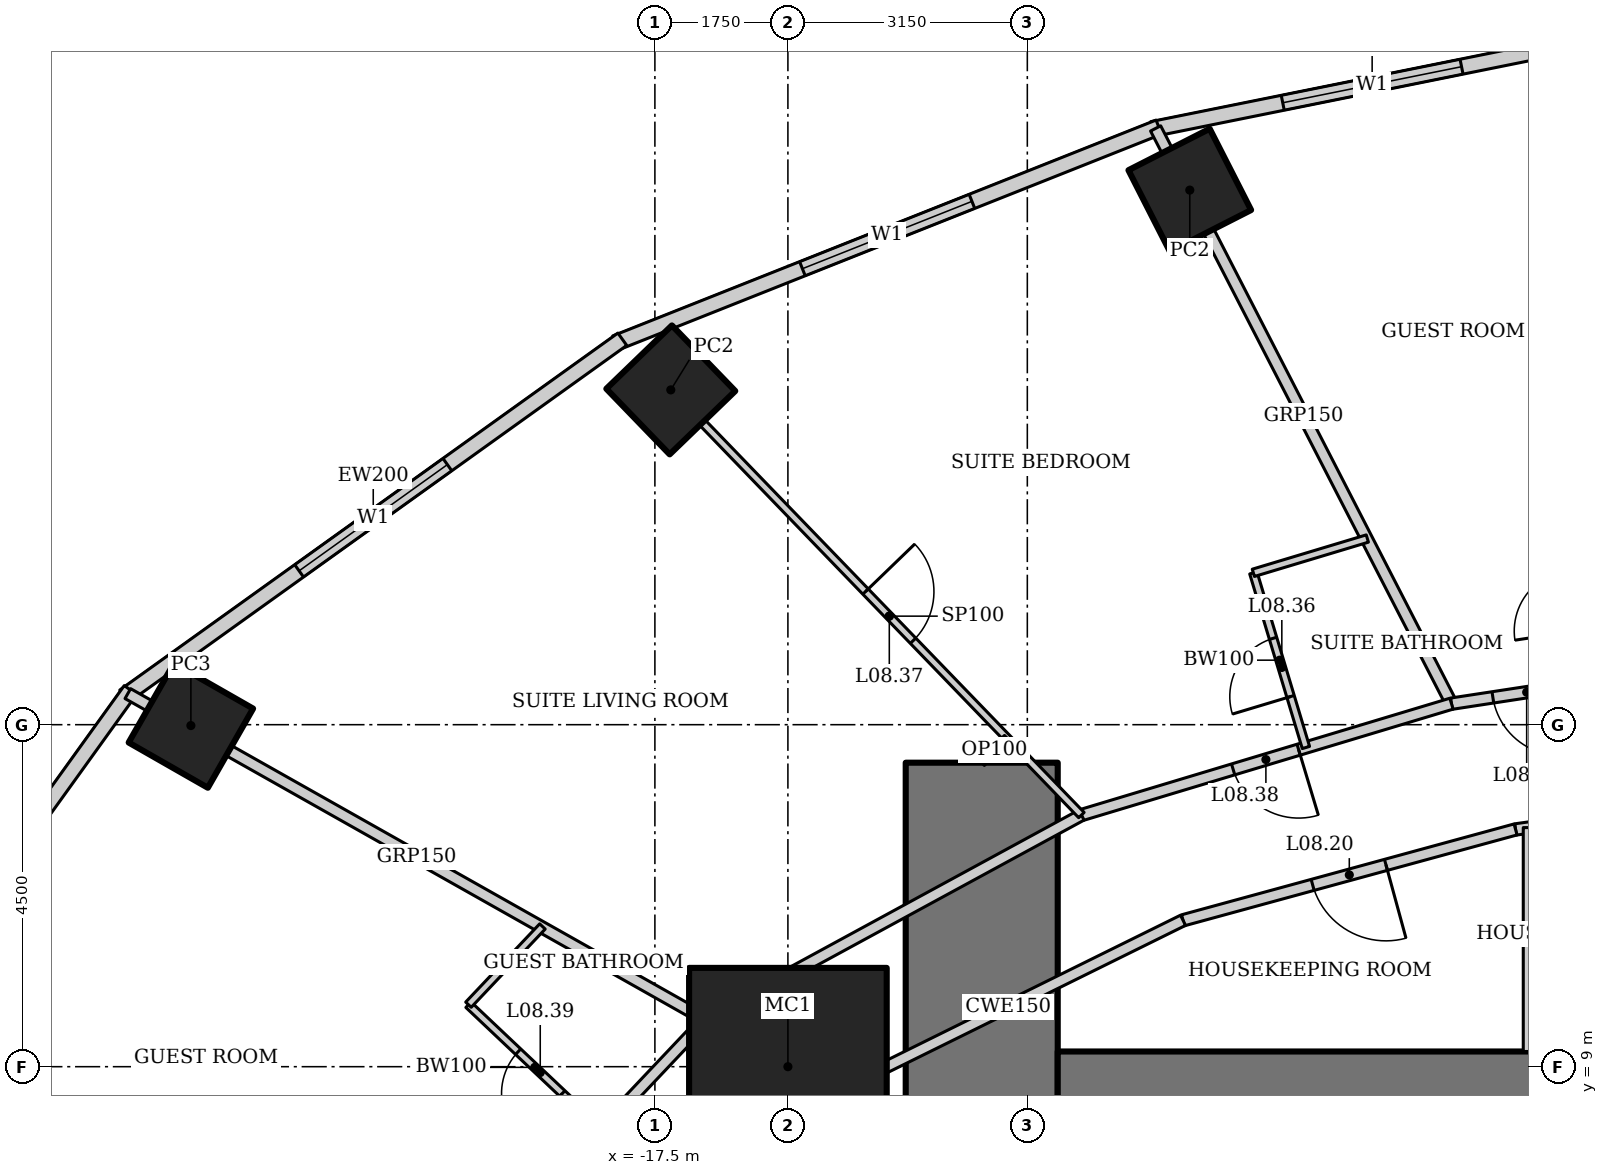
"""IFC4 building model, lengths in metres.
Left out: names, types, materials, properties, quantities, classifications, styles, units other than length and angle.
Written with IfcOpenShell. Run it as: python <this file> out.ifc"""

import sys

from ifc_helpers import new_model, si_unit, direction, frame, frame_2d, origin, origin_2d, place, context, subcontext, project, spatial, rectangle, hollow_rectangle, extrude, element, fill, save


model = new_model("IFC4")
c1 = context("Model", 3, precision=1e-05, world=origin(), true_north=direction((0.0, 1.0)))
c2 = subcontext(c1, "Body", "Model", "MODEL_VIEW")
j1 = project(units=[si_unit("LENGTHUNIT", "METRE"), si_unit("PLANEANGLEUNIT", "RADIAN")], contexts=[c1])
p1 = place(None, origin())
s1 = spatial("IfcSite", under=j1, at=p1, CompositionType="ELEMENT")
p2 = place(p1, origin())
s2 = spatial("IfcBuilding", under=s1, at=p2, CompositionType="ELEMENT")
p3 = place(p2, frame((0.0, 0.0, 44.2)))
s3 = spatial("IfcBuildingStorey", under=s2, at=p3, CompositionType="ELEMENT", Elevation=44.2)
p4 = place(p3, frame((-15.75, 9.0, 0.0), z_axis=(0.0, 0.0, 1.0), x_axis=(1.0, 0.0, 0.0)))
e1 = element("IfcColumn", 1, at=p4, inside=s3, PredefinedType="COLUMN", context=c2, shape_type="SweptSolid", body=[
    extrude(hollow_rectangle(XDim=2.6, YDim=2.6, WallThickness=0.13, at=origin_2d()), origin(), (0.0, 0.0, 1.0), 3.6),
])
for number, where, z_axis, x_axis in (
    (2, (-10.463, 20.534, 0.0), (0.0, 0.0, 1.0), (0.891, 0.454, 0.0)),
    (3, (-17.291, 17.905, 0.0), (0.0, 0.0, 1.0), (0.719, 0.695, 0.0)),
):
    element("IfcColumn", number, at=place(p3, frame(where, z_axis=z_axis, x_axis=x_axis)), inside=s3, PredefinedType="COLUMN", context=c2, shape_type="SweptSolid", body=[
        extrude(hollow_rectangle(XDim=1.2, YDim=1.2, WallThickness=0.1, at=origin_2d()), origin(), (0.0, 0.0, 1.0), 3.6),
    ])
p5 = place(p3, frame((-23.605, 13.489, 0.0), z_axis=(0.0, 0.0, 1.0), x_axis=(0.496139221777, 0.86824298017, 0.0)))
e4 = element("IfcColumn", 4, at=p5, inside=s3, PredefinedType="COLUMN", context=c2, shape_type="SweptSolid", body=[
    extrude(hollow_rectangle(XDim=1.2, YDim=1.2, WallThickness=0.12, at=origin_2d()), origin(), (0.0, 0.0, 1.0), 3.6),
])
p6 = place(p3, frame((-13.2, 13.0, 0.0), z_axis=(0.0, 0.0, 1.0), x_axis=(0.0, -1.0, 0.0)))
e5 = element("IfcWall", 5, at=p6, inside=s3, PredefinedType="SHEAR", context=c2, shape_type="SweptSolid", body=[
    extrude(rectangle(XDim=26.0, YDim=2.0, at=frame_2d((13.0, 0.0))), origin(), (0.0, 0.0, 1.0), 3.6),
])
p7 = place(p6, frame((12.1, 0.0, 0.0)))
e6 = element("IfcOpeningElement", 6, at=p7, cuts=e5, PredefinedType="OPENING", context=c2, shape_type="SweptSolid", body=[
    extrude(rectangle(XDim=1.8, YDim=2.1, at=frame_2d((0.9, 1.05))), frame((0.0, 1.01, 0.0), z_axis=(0.0, -1.0, 0.0), x_axis=(1.0, 0.0, 0.0)), (0.0, 0.0, 1.0), 2.02),
])
p8 = place(p3, frame((12.2, 8.0, 0.0), z_axis=(0.0, 0.0, 1.0), x_axis=(-1.0, 0.0, 0.0)))
e7 = element("IfcWall", 7, at=p8, inside=s3, PredefinedType="SHEAR", context=c2, shape_type="SweptSolid", body=[
    extrude(rectangle(XDim=24.4, YDim=2.4, at=frame_2d((12.2, 0.0))), origin(), (0.0, 0.0, 1.0), 3.6),
])
p9 = place(p3, frame((-5.17, 22.504, 0.0), z_axis=(0.0, 0.0, 1.0), x_axis=(-0.980251657452, -0.197754110105, 0.0)))
e8 = element("IfcWall", 8, at=p9, inside=s3, PredefinedType="SOLIDWALL", context=c2, shape_type="SweptSolid", body=[
    extrude(rectangle(XDim=5.904, YDim=0.2, at=frame_2d((2.952, 0.0))), origin(), (0.0, 0.0, 1.0), 3.45),
])
p10 = place(p9, frame((1.752, 0.0, 0.5)))
e9 = element("IfcOpeningElement", 9, at=p10, cuts=e8, PredefinedType="OPENING", context=c2, shape_type="SweptSolid", body=[
    extrude(rectangle(XDim=2.4, YDim=2.2, at=frame_2d((1.2, 1.1))), frame((0.0, 0.11, 0.0), z_axis=(0.0, -1.0, 0.0), x_axis=(1.0, 0.0, 0.0)), (0.0, 0.0, 1.0), 0.22),
])
p11 = place(p3, frame((-10.869, 21.363, 0.0), z_axis=(0.0, 0.0, 1.0), x_axis=(-0.929358351251, -0.369178892895, 0.0)))
e10 = element("IfcWall", 10, at=p11, inside=s3, PredefinedType="SOLIDWALL", context=c2, shape_type="SweptSolid", body=[
    extrude(rectangle(XDim=7.692, YDim=0.2, at=frame_2d((3.846, 0.0))), origin(), (0.0, 0.0, 1.0), 3.45),
])
p12 = place(p11, frame((2.646, 0.0, 0.5)))
e11 = element("IfcOpeningElement", 11, at=p12, cuts=e10, PredefinedType="OPENING", context=c2, shape_type="SweptSolid", body=[
    extrude(rectangle(XDim=2.4, YDim=2.2, at=frame_2d((1.2, 1.1))), frame((0.0, 0.11, 0.0), z_axis=(0.0, -1.0, 0.0), x_axis=(1.0, 0.0, 0.0)), (0.0, 0.0, 1.0), 0.22),
])
p13 = place(p3, frame((-17.929, 18.572, 0.0), z_axis=(0.0, 0.0, 1.0), x_axis=(-0.812791321576, -0.582554948112, 0.0)))
e12 = element("IfcWall", 12, at=p13, inside=s3, PredefinedType="SOLIDWALL", context=c2, shape_type="SweptSolid", body=[
    extrude(rectangle(XDim=8.063, YDim=0.2, at=frame_2d((4.032, 0.0))), origin(), (0.0, 0.0, 1.0), 3.45),
])
p14 = place(p13, frame((2.832, 0.0, 0.5)))
e13 = element("IfcOpeningElement", 13, at=p14, cuts=e12, PredefinedType="OPENING", context=c2, shape_type="SweptSolid", body=[
    extrude(rectangle(XDim=2.4, YDim=2.2, at=frame_2d((1.2, 1.1))), frame((0.0, 0.11, 0.0), z_axis=(0.0, -1.0, 0.0), x_axis=(1.0, 0.0, 0.0)), (0.0, 0.0, 1.0), 0.22),
])
p15 = place(p3, frame((-24.4, 13.957, 0.0), z_axis=(0.0, 0.0, 1.0), x_axis=(-0.583937613703, -0.811798536155, 0.0)))
e14 = element("IfcWall", 14, at=p15, inside=s3, PredefinedType="SOLIDWALL", context=c2, shape_type="SweptSolid", body=[
    extrude(rectangle(XDim=8.323, YDim=0.2, at=frame_2d((4.162, 0.0))), origin(), (0.0, 0.0, 1.0), 3.45),
])
p16 = place(p15, frame((2.961, 0.0, 0.5)))
e15 = element("IfcOpeningElement", 15, at=p16, cuts=e14, PredefinedType="OPENING", context=c2, shape_type="SweptSolid", body=[
    extrude(rectangle(XDim=2.4, YDim=2.2, at=frame_2d((1.2, 1.1))), frame((0.0, 0.11, 0.0), z_axis=(0.0, -1.0, 0.0), x_axis=(1.0, 0.0, 0.0)), (0.0, 0.0, 1.0), 0.22),
])
p17 = place(p3, frame((-10.912, 21.346, 0.0), z_axis=(0.0, 0.0, 1.0), x_axis=(0.457327273085, -0.889298468059, 0.0)))
e16 = element("IfcWall", 16, at=p17, inside=s3, PredefinedType="PARTITIONING", context=c2, shape_type="SweptSolid", body=[
    extrude(rectangle(XDim=8.511, YDim=0.15, at=frame_2d((4.256, 0.0))), origin(), (0.0, 0.0, 1.0), 2.528),
])
p18 = place(p3, frame((-24.435, 13.909, 0.0), z_axis=(0.0, 0.0, 1.0), x_axis=(0.87090601027, -0.491449612143, 0.0)))
e17 = element("IfcWall", 17, at=p18, inside=s3, PredefinedType="PARTITIONING", context=c2, shape_type="SweptSolid", body=[
    extrude(rectangle(XDim=8.726, YDim=0.15, at=frame_2d((4.363, 0.0))), origin(), (0.0, 0.0, 1.0), 2.693),
])
p19 = place(p3, frame((-3.311, 14.342, 0.0), z_axis=(0.0, 0.0, 1.0), x_axis=(-0.988564270062, -0.150800145746, 0.0)))
e18 = element("IfcWall", 18, at=p19, inside=s3, PredefinedType="PARTITIONING", context=c2, shape_type="SweptSolid", body=[
    extrude(rectangle(XDim=3.751, YDim=0.15, at=frame_2d((1.875, 0.0))), origin(), (0.0, 0.0, 1.0), 3.45),
])
p20 = place(p19, frame((2.3, 0.0, 0.0)))
e19 = element("IfcOpeningElement", 19, at=p20, cuts=e18, PredefinedType="OPENING", context=c2, shape_type="SweptSolid", body=[
    extrude(rectangle(XDim=0.9, YDim=2.1, at=frame_2d((0.45, 1.05))), frame((0.0, 0.085, 0.0), z_axis=(0.0, -1.0, 0.0), x_axis=(1.0, 0.0, 0.0)), (0.0, 0.0, 1.0), 0.17),
])
p21 = place(p3, frame((-7.019, 13.776, 0.0), z_axis=(0.0, 0.0, 1.0), x_axis=(-0.957564241242, -0.288219922793, 0.0)))
e20 = element("IfcWall", 20, at=p21, inside=s3, PredefinedType="PARTITIONING", context=c2, shape_type="SweptSolid", body=[
    extrude(rectangle(XDim=5.085, YDim=0.15, at=frame_2d((2.542, 0.0))), origin(), (0.0, 0.0, 1.0), 3.45),
])
p22 = place(p21, frame((2.1, 0.0, 0.0)))
e21 = element("IfcOpeningElement", 21, at=p22, cuts=e20, PredefinedType="OPENING", context=c2, shape_type="SweptSolid", body=[
    extrude(rectangle(XDim=0.9, YDim=2.1, at=frame_2d((0.45, 1.05))), frame((0.0, 0.085, 0.0), z_axis=(0.0, -1.0, 0.0), x_axis=(1.0, 0.0, 0.0)), (0.0, 0.0, 1.0), 0.17),
])
p23 = place(p3, frame((-11.888, 12.311, 0.0), z_axis=(0.0, 0.0, 1.0), x_axis=(-0.878450059298, -0.477834169267, 0.0)))
e22 = element("IfcWall", 22, at=p23, inside=s3, PredefinedType="PARTITIONING", context=c2, shape_type="SweptSolid", body=[
    extrude(rectangle(XDim=5.631, YDim=0.15, at=frame_2d((2.815, 0.0))), origin(), (0.0, 0.0, 1.0), 3.45),
])
p24 = place(p3, frame((-16.835, 9.62, 0.0), z_axis=(0.0, 0.0, 1.0), x_axis=(-0.687062608696, -0.726598218916, 0.0)))
e23 = element("IfcWall", 23, at=p24, inside=s3, PredefinedType="PARTITIONING", context=c2, shape_type="SweptSolid", body=[
    extrude(rectangle(XDim=6.039, YDim=0.15, at=frame_2d((3.02, 0.0))), origin(), (0.0, 0.0, 1.0), 3.45),
])
p25 = place(p24, frame((4.989, 0.0, 0.0)))
e24 = element("IfcOpeningElement", 24, at=p25, cuts=e23, PredefinedType="OPENING", context=c2, shape_type="SweptSolid", body=[
    extrude(rectangle(XDim=0.9, YDim=2.1, at=frame_2d((0.45, 1.05))), frame((0.0, 0.085, 0.0), z_axis=(0.0, -1.0, 0.0), x_axis=(1.0, 0.0, 0.0)), (0.0, 0.0, 1.0), 0.17),
])
p26 = place(p3, frame((-2.903, 12.574, 0.0), z_axis=(0.0, 0.0, 1.0), x_axis=(-0.990563451353, -0.137054911782, 0.0)))
e25 = element("IfcWall", 25, at=p26, inside=s3, PredefinedType="PARTITIONING", context=c2, shape_type="SweptSolid", body=[
    extrude(rectangle(XDim=3.304, YDim=0.15, at=frame_2d((1.652, 0.0))), origin(), (0.0, 0.0, 1.0), 3.45),
])
p27 = place(p26, frame((1.308, 0.0, 0.0)))
e26 = element("IfcOpeningElement", 26, at=p27, cuts=e25, PredefinedType="OPENING", context=c2, shape_type="SweptSolid", body=[
    extrude(rectangle(XDim=0.9, YDim=2.1, at=frame_2d((0.45, 1.05))), frame((0.0, 0.085, 0.0), z_axis=(0.0, -1.0, 0.0), x_axis=(1.0, 0.0, 0.0)), (0.0, 0.0, 1.0), 0.17),
])
p28 = place(p3, frame((-6.176, 12.122, 0.0), z_axis=(0.0, 0.0, 1.0), x_axis=(-0.964644466646, -0.263554648923, 0.0)))
e27 = element("IfcWall", 27, at=p28, inside=s3, PredefinedType="PARTITIONING", context=c2, shape_type="SweptSolid", body=[
    extrude(rectangle(XDim=4.535, YDim=0.15, at=frame_2d((2.268, 0.0))), origin(), (0.0, 0.0, 1.0), 3.45),
])
p29 = place(p28, frame((1.768, 0.0, 0.0)))
e28 = element("IfcOpeningElement", 28, at=p29, cuts=e27, PredefinedType="OPENING", context=c2, shape_type="SweptSolid", body=[
    extrude(rectangle(XDim=1.0, YDim=2.1, at=frame_2d((0.5, 1.05))), frame((0.0, 0.085, 0.0), z_axis=(0.0, -1.0, 0.0), x_axis=(1.0, 0.0, 0.0)), (0.0, 0.0, 1.0), 0.17),
])
p30 = place(p3, frame((-10.551, 10.926, 0.0), z_axis=(0.0, 0.0, 1.0), x_axis=(-0.89656943448, -0.442903205177, 0.0)))
e29 = element("IfcWall", 29, at=p30, inside=s3, PredefinedType="PARTITIONING", context=c2, shape_type="SweptSolid", body=[
    extrude(rectangle(XDim=5.126, YDim=0.15, at=frame_2d((2.563, 0.0))), origin(), (0.0, 0.0, 1.0), 3.45),
])
p31 = place(p3, frame((-15.147, 8.656, 0.0), z_axis=(0.0, 0.0, 1.0), x_axis=(-0.720837261072, -0.693104352209, 0.0)))
e30 = element("IfcWall", 30, at=p31, inside=s3, PredefinedType="PARTITIONING", context=c2, shape_type="SweptSolid", body=[
    extrude(rectangle(XDim=5.59, YDim=0.15, at=frame_2d((2.795, 0.0))), origin(), (0.0, 0.0, 1.0), 3.45),
])
p32 = place(p31, frame((2.295, 0.0, 0.0)))
e31 = element("IfcOpeningElement", 31, at=p32, cuts=e30, PredefinedType="OPENING", context=c2, shape_type="SweptSolid", body=[
    extrude(rectangle(XDim=1.0, YDim=2.1, at=frame_2d((0.5, 1.05))), frame((0.0, 0.085, 0.0), z_axis=(0.0, -1.0, 0.0), x_axis=(1.0, 0.0, 0.0)), (0.0, 0.0, 1.0), 0.17),
])
p33 = place(p3, frame((-6.0, 9.2, 0.0), z_axis=(0.0, 0.0, 1.0), x_axis=(0.0, 1.0, 0.0)))
e32 = element("IfcWall", 32, at=p33, inside=s3, PredefinedType="SOLIDWALL", context=c2, shape_type="SweptSolid", body=[
    extrude(rectangle(XDim=2.946, YDim=0.15, at=frame_2d((1.473, 0.0))), origin(), (0.0, 0.0, 1.0), 3.046),
])
p34 = place(p3, frame((-8.935, 13.2, 0.0), z_axis=(0.0, 0.0, 1.0), x_axis=(-0.288197066254, 0.957571120598, 0.0)))
e33 = element("IfcWall", 33, at=p34, inside=s3, PredefinedType="PARTITIONING", context=c2, shape_type="SweptSolid", body=[
    extrude(rectangle(XDim=2.4, YDim=0.1, at=frame_2d((1.2, 0.0))), origin(), (0.0, 0.0, 1.0), 3.45),
])
p35 = place(p34, frame((0.7, 0.0, 0.0)))
e34 = element("IfcOpeningElement", 34, at=p35, cuts=e33, PredefinedType="OPENING", context=c2, shape_type="SweptSolid", body=[
    extrude(rectangle(XDim=0.8, YDim=2.1, at=frame_2d((0.4, 1.05))), frame((0.0, 0.06, 0.0), z_axis=(0.0, -1.0, 0.0), x_axis=(1.0, 0.0, 0.0)), (0.0, 0.0, 1.0), 0.12),
])
p36 = place(p3, frame((-9.626, 15.498, 0.0), z_axis=(0.0, 0.0, 1.0), x_axis=(0.957551231109, 0.288263143328, 0.0)))
e35 = element("IfcWall", 35, at=p36, inside=s3, PredefinedType="PARTITIONING", context=c2, shape_type="SweptSolid", body=[
    extrude(rectangle(XDim=1.566, YDim=0.1, at=frame_2d((0.783, 0.0))), origin(), (0.0, 0.0, 1.0), 3.45),
])
p37 = place(p3, frame((-16.944, 17.545, 0.0), z_axis=(0.0, 0.0, 1.0), x_axis=(0.694669949151, -0.719328618746, 0.0)))
e36 = element("IfcWall", 36, at=p37, inside=s3, PredefinedType="PARTITIONING", context=c2, shape_type="SweptSolid", body=[
    extrude(rectangle(XDim=7.277, YDim=0.1, at=frame_2d((3.639, 0.0))), origin(), (0.0, 0.0, 1.0), 2.528),
])
p38 = place(p37, frame((3.189, 0.0, 0.0)))
e37 = element("IfcOpeningElement", 37, at=p38, cuts=e36, PredefinedType="OPENING", context=c2, shape_type="SweptSolid", body=[
    extrude(rectangle(XDim=0.9, YDim=2.1, at=frame_2d((0.45, 1.05))), frame((0.0, 0.06, 0.0), z_axis=(0.0, -1.0, 0.0), x_axis=(1.0, 0.0, 0.0)), (0.0, 0.0, 1.0), 0.12),
])
p39 = place(p3, frame((-18.209, 8.167, 0.0), z_axis=(0.0, 0.0, 1.0), x_axis=(-0.726567238928, 0.687095369885, 0.0)))
e38 = element("IfcWall", 38, at=p39, inside=s3, PredefinedType="PARTITIONING", context=c2, shape_type="SweptSolid", body=[
    extrude(rectangle(XDim=2.4, YDim=0.1, at=frame_2d((1.2, 0.0))), origin(), (0.0, 0.0, 1.0), 3.45),
])
p40 = place(p39, frame((0.7, 0.0, 0.0)))
e39 = element("IfcOpeningElement", 39, at=p40, cuts=e38, PredefinedType="OPENING", context=c2, shape_type="SweptSolid", body=[
    extrude(rectangle(XDim=0.8, YDim=2.1, at=frame_2d((0.4, 1.05))), frame((0.0, 0.06, 0.0), z_axis=(0.0, -1.0, 0.0), x_axis=(1.0, 0.0, 0.0)), (0.0, 0.0, 1.0), 0.12),
])
p41 = place(p3, frame((-19.953, 9.816, 0.0), z_axis=(0.0, 0.0, 1.0), x_axis=(0.687017997787, 0.726640399866, 0.0)))
e40 = element("IfcWall", 40, at=p41, inside=s3, PredefinedType="PARTITIONING", context=c2, shape_type="SweptSolid", body=[
    extrude(rectangle(XDim=1.417, YDim=0.1, at=frame_2d((0.708, 0.0))), origin(), (0.0, 0.0, 1.0), 3.45),
])
p42 = place(p3, frame((-13.2, 13.0, 0.0), z_axis=(0.0, 0.0, 1.0), x_axis=(0.719347134512, 0.69465077562, 0.0)))
e41 = element("IfcWall", 41, at=p42, inside=s3, PredefinedType="PARTITIONING", context=c2, shape_type="SweptSolid", body=[
    extrude(rectangle(XDim=0.465, YDim=0.1, at=frame_2d((0.232, 0.0))), origin(), (0.0, 0.0, 1.0), 3.45),
])
p43 = place(p10, origin())
e42 = element("IfcWindow", 42, at=p43, inside=s3, PartitioningType="SINGLE_PANEL", PredefinedType="WINDOW", context=c2, shape_type="SweptSolid", body=[
    extrude(rectangle(XDim=2.4, YDim=2.2, at=frame_2d((1.2, 1.1))), frame((0.0, 0.03, 0.0), z_axis=(0.0, -1.0, 0.0), x_axis=(1.0, 0.0, 0.0)), (0.0, 0.0, 1.0), 0.06),
])
fill(e9, e42)
p44 = place(p12, origin())
e43 = element("IfcWindow", 43, at=p44, inside=s3, PartitioningType="SINGLE_PANEL", PredefinedType="WINDOW", context=c2, shape_type="SweptSolid", body=[
    extrude(rectangle(XDim=2.4, YDim=2.2, at=frame_2d((1.2, 1.1))), frame((0.0, 0.03, 0.0), z_axis=(0.0, -1.0, 0.0), x_axis=(1.0, 0.0, 0.0)), (0.0, 0.0, 1.0), 0.06),
])
fill(e11, e43)
p45 = place(p14, origin())
e44 = element("IfcWindow", 44, at=p45, inside=s3, PartitioningType="SINGLE_PANEL", PredefinedType="WINDOW", context=c2, shape_type="SweptSolid", body=[
    extrude(rectangle(XDim=2.4, YDim=2.2, at=frame_2d((1.2, 1.1))), frame((0.0, 0.03, 0.0), z_axis=(0.0, -1.0, 0.0), x_axis=(1.0, 0.0, 0.0)), (0.0, 0.0, 1.0), 0.06),
])
fill(e13, e44)
p46 = place(p29, origin())
e45 = element("IfcDoor", 45, at=p46, inside=s3, OperationType="SINGLE_SWING_LEFT", PredefinedType="DOOR", context=c2, shape_type="SweptSolid", body=[
    extrude(rectangle(XDim=1.0, YDim=2.1, at=frame_2d((0.5, 1.05))), frame((0.0, 0.025, 0.0), z_axis=(0.0, -1.0, 0.0), x_axis=(1.0, 0.0, 0.0)), (0.0, 0.0, 1.0), 0.05),
])
fill(e28, e45)
p47 = place(p20, origin())
e46 = element("IfcDoor", 46, at=p47, inside=s3, OperationType="SINGLE_SWING_LEFT", PredefinedType="DOOR", context=c2, shape_type="SweptSolid", body=[
    extrude(rectangle(XDim=0.9, YDim=2.1, at=frame_2d((0.45, 1.05))), frame((0.0, 0.025, 0.0), z_axis=(0.0, -1.0, 0.0), x_axis=(1.0, 0.0, 0.0)), (0.0, 0.0, 1.0), 0.05),
])
fill(e19, e46)
p48 = place(p35, origin())
e47 = element("IfcDoor", 47, at=p48, inside=s3, OperationType="SINGLE_SWING_LEFT", PredefinedType="DOOR", context=c2, shape_type="SweptSolid", body=[
    extrude(rectangle(XDim=0.8, YDim=2.1, at=frame_2d((0.4, 1.05))), frame((0.0, 0.025, 0.0), z_axis=(0.0, -1.0, 0.0), x_axis=(1.0, 0.0, 0.0)), (0.0, 0.0, 1.0), 0.05),
])
fill(e34, e47)
p49 = place(p38, origin())
e48 = element("IfcDoor", 48, at=p49, inside=s3, OperationType="SINGLE_SWING_LEFT", PredefinedType="DOOR", context=c2, shape_type="SweptSolid", body=[
    extrude(rectangle(XDim=0.9, YDim=2.1, at=frame_2d((0.45, 1.05))), frame((0.0, 0.025, 0.0), z_axis=(0.0, -1.0, 0.0), x_axis=(1.0, 0.0, 0.0)), (0.0, 0.0, 1.0), 0.05),
])
fill(e37, e48)
p50 = place(p22, origin())
e49 = element("IfcDoor", 49, at=p50, inside=s3, OperationType="SINGLE_SWING_LEFT", PredefinedType="DOOR", context=c2, shape_type="SweptSolid", body=[
    extrude(rectangle(XDim=0.9, YDim=2.1, at=frame_2d((0.45, 1.05))), frame((0.0, 0.025, 0.0), z_axis=(0.0, -1.0, 0.0), x_axis=(1.0, 0.0, 0.0)), (0.0, 0.0, 1.0), 0.05),
])
fill(e21, e49)
p51 = place(p40, origin())
e50 = element("IfcDoor", 50, at=p51, inside=s3, OperationType="SINGLE_SWING_LEFT", PredefinedType="DOOR", context=c2, shape_type="SweptSolid", body=[
    extrude(rectangle(XDim=0.8, YDim=2.1, at=frame_2d((0.4, 1.05))), frame((0.0, 0.025, 0.0), z_axis=(0.0, -1.0, 0.0), x_axis=(1.0, 0.0, 0.0)), (0.0, 0.0, 1.0), 0.05),
])
fill(e39, e50)
save(model, sys.argv[1])
